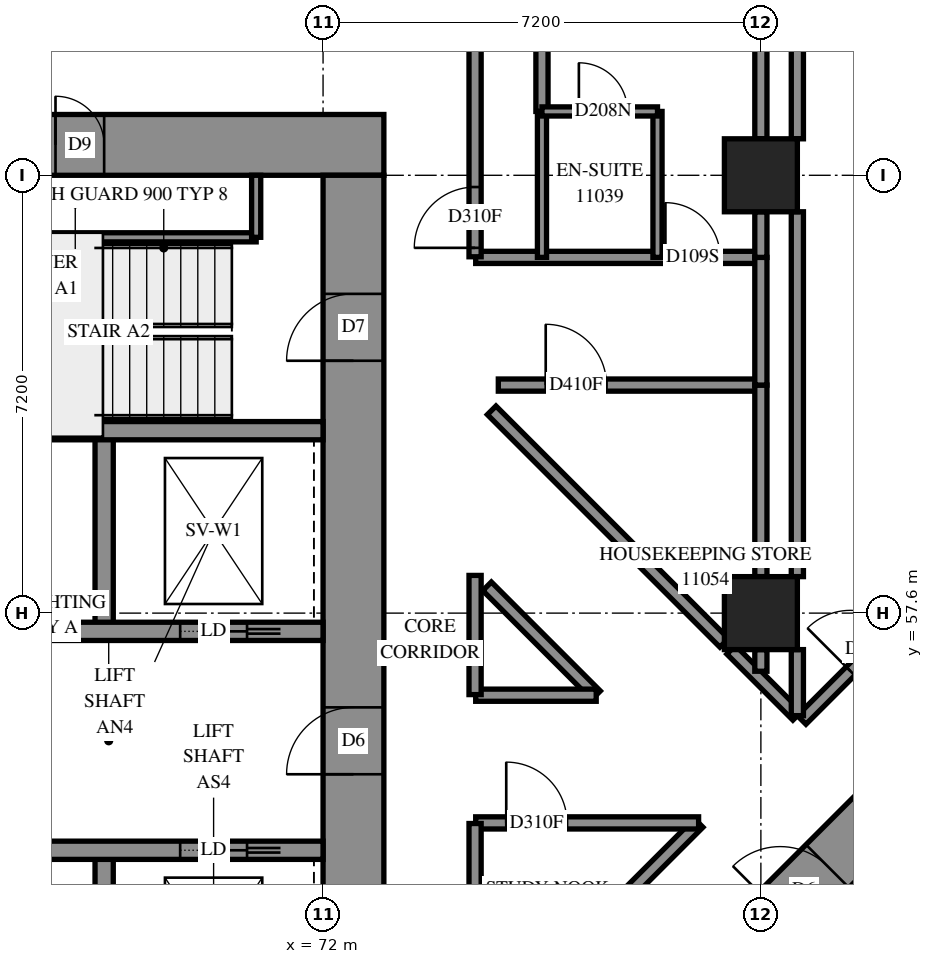
"""IFC4 building model, lengths in metres.
Left out: names, types, materials, properties, quantities, classifications, styles, units other than length and angle.
Written with IfcOpenShell. Run it as: python <this file> out.ifc"""

import sys

from ifc_helpers import new_model, si_unit, direction, frame, frame_2d, origin, origin_2d, place, context, subcontext, project, spatial, rectangle, extrude, element, fill, save


model = new_model("IFC4")
c1 = context("Model", 3, precision=1e-05, world=origin(), true_north=direction((0.0, 1.0)))
c2 = subcontext(c1, "Body", "Model", "MODEL_VIEW")
j1 = project(units=[si_unit("LENGTHUNIT", "METRE"), si_unit("PLANEANGLEUNIT", "RADIAN")], contexts=[c1])
p1 = place(None, origin())
s1 = spatial("IfcSite", under=j1, at=p1, CompositionType="ELEMENT")
p2 = place(p1, origin())
s2 = spatial("IfcBuilding", under=s1, at=p2, CompositionType="ELEMENT")
p3 = place(p2, frame((0.0, 0.0, 44.0)))
s3 = spatial("IfcBuildingStorey", under=s2, at=p3, CompositionType="ELEMENT", Elevation=44.0)
for number, where, z_axis, x_axis in (
    (1, (79.2, 57.6, 0.0), (0.0, 0.0, 1.0), (1.0, 0.0, 0.0)),
    (2, (79.2, 64.8, 0.0), (0.0, 0.0, 1.0), (1.0, 0.0, 0.0)),
):
    element("IfcColumn", number, at=place(p3, frame(where, z_axis=z_axis, x_axis=x_axis)), inside=s3, PredefinedType="COLUMN", context=c2, shape_type="SweptSolid", body=[
        extrude(rectangle(XDim=1.2, YDim=1.2, at=origin_2d()), origin(), (0.0, 0.0, 1.0), 3.1),
    ])
p4 = place(p3, frame((56.6, 65.3, -0.3), z_axis=(0.0, 0.0, 1.0), x_axis=(1.0, 0.0, 0.0)))
e3 = element("IfcWall", 3, at=p4, inside=s3, PredefinedType="SHEAR", context=c2, shape_type="SweptSolid", body=[
    extrude(rectangle(XDim=16.4, YDim=1.0, at=frame_2d((8.2, 0.0))), origin(), (0.0, 0.0, 1.0), 2.7),
])
p5 = place(p4, frame((11.0, 0.0, 0.3)))
e4 = element("IfcOpeningElement", 4, at=p5, cuts=e3, PredefinedType="OPENING", context=c2, shape_type="SweptSolid", body=[
    extrude(rectangle(XDim=0.8, YDim=2.1, at=frame_2d((0.4, 1.05))), frame((0.0, 0.51, 0.0), z_axis=(0.0, -1.0, 0.0), x_axis=(1.0, 0.0, 0.0)), (0.0, 0.0, 1.0), 1.02),
])
p6 = place(p3, frame((72.5, 50.4, -0.3), z_axis=(0.0, 0.0, 1.0), x_axis=(0.0, 1.0, 0.0)))
e5 = element("IfcWall", 5, at=p6, inside=s3, PredefinedType="SHEAR", context=c2, shape_type="SweptSolid", body=[
    extrude(rectangle(XDim=14.4, YDim=1.0, at=frame_2d((7.2, 0.0))), origin(), (0.0, 0.0, 1.0), 2.7),
])
p7 = place(p6, frame((4.55, 0.0, 0.3)))
e6 = element("IfcOpeningElement", 6, at=p7, cuts=e5, PredefinedType="OPENING", context=c2, shape_type="SweptSolid", body=[
    extrude(rectangle(XDim=1.1, YDim=2.1, at=frame_2d((0.55, 1.05))), frame((0.0, 0.51, 0.0), z_axis=(0.0, -1.0, 0.0), x_axis=(1.0, 0.0, 0.0)), (0.0, 0.0, 1.0), 1.02),
])
p8 = place(p6, frame((11.35, 0.0, 0.3)))
e7 = element("IfcOpeningElement", 7, at=p8, cuts=e5, PredefinedType="OPENING", context=c2, shape_type="SweptSolid", body=[
    extrude(rectangle(XDim=1.1, YDim=2.1, at=frame_2d((0.55, 1.05))), frame((0.0, 0.51, 0.0), z_axis=(0.0, -1.0, 0.0), x_axis=(1.0, 0.0, 0.0)), (0.0, 0.0, 1.0), 1.02),
])
for number, where, z_axis, x_axis in (
    (8, (68.4, 50.4, 0.0), (0.0, 0.0, 1.0), (0.0, 1.0, 0.0)),
    (9, (68.4, 57.3, 0.0), (0.0, 0.0, 1.0), (0.0, 1.0, 0.0)),
):
    element("IfcWall", number, at=place(p3, frame(where, z_axis=z_axis, x_axis=x_axis)), inside=s3, PredefinedType="SOLIDWALL", context=c2, shape_type="SweptSolid", body=[
        extrude(rectangle(XDim=3.3, YDim=0.3, at=frame_2d((1.65, 0.0))), origin(), (0.0, 0.0, 1.0), 3.1),
    ])
p9 = place(p3, frame((57.6, 53.7, 0.0), z_axis=(0.0, 0.0, 1.0), x_axis=(1.0, 0.0, 0.0)))
e10 = element("IfcWall", 10, at=p9, inside=s3, PredefinedType="SOLIDWALL", context=c2, shape_type="SweptSolid", body=[
    extrude(rectangle(XDim=14.4, YDim=0.3, at=frame_2d((7.2, 0.0))), origin(), (0.0, 0.0, 1.0), 3.1),
])
p10 = place(p9, frame((1.25, 0.0, 0.0)))
e11 = element("IfcOpeningElement", 11, at=p10, cuts=e10, PredefinedType="OPENING", context=c2, shape_type="SweptSolid", body=[
    extrude(rectangle(XDim=1.1, YDim=2.1, at=frame_2d((0.55, 1.05))), frame((0.0, 0.16, 0.0), z_axis=(0.0, -1.0, 0.0), x_axis=(1.0, 0.0, 0.0)), (0.0, 0.0, 1.0), 0.32),
])
p11 = place(p9, frame((4.85, 0.0, 0.0)))
e12 = element("IfcOpeningElement", 12, at=p11, cuts=e10, PredefinedType="OPENING", context=c2, shape_type="SweptSolid", body=[
    extrude(rectangle(XDim=1.1, YDim=2.1, at=frame_2d((0.55, 1.05))), frame((0.0, 0.16, 0.0), z_axis=(0.0, -1.0, 0.0), x_axis=(1.0, 0.0, 0.0)), (0.0, 0.0, 1.0), 0.32),
])
p12 = place(p9, frame((8.45, 0.0, 0.0)))
e13 = element("IfcOpeningElement", 13, at=p12, cuts=e10, PredefinedType="OPENING", context=c2, shape_type="SweptSolid", body=[
    extrude(rectangle(XDim=1.1, YDim=2.1, at=frame_2d((0.55, 1.05))), frame((0.0, 0.16, 0.0), z_axis=(0.0, -1.0, 0.0), x_axis=(1.0, 0.0, 0.0)), (0.0, 0.0, 1.0), 0.32),
])
p13 = place(p9, frame((12.05, 0.0, 0.0)))
e14 = element("IfcOpeningElement", 14, at=p13, cuts=e10, PredefinedType="OPENING", context=c2, shape_type="SweptSolid", body=[
    extrude(rectangle(XDim=1.1, YDim=2.1, at=frame_2d((0.55, 1.05))), frame((0.0, 0.16, 0.0), z_axis=(0.0, -1.0, 0.0), x_axis=(1.0, 0.0, 0.0)), (0.0, 0.0, 1.0), 0.32),
])
p14 = place(p3, frame((57.6, 57.3, 0.0), z_axis=(0.0, 0.0, 1.0), x_axis=(1.0, 0.0, 0.0)))
e15 = element("IfcWall", 15, at=p14, inside=s3, PredefinedType="SOLIDWALL", context=c2, shape_type="SweptSolid", body=[
    extrude(rectangle(XDim=14.4, YDim=0.3, at=frame_2d((7.2, 0.0))), origin(), (0.0, 0.0, 1.0), 3.1),
])
p15 = place(p14, frame((12.05, 0.0, 0.0)))
e16 = element("IfcOpeningElement", 16, at=p15, cuts=e15, PredefinedType="OPENING", context=c2, shape_type="SweptSolid", body=[
    extrude(rectangle(XDim=1.1, YDim=2.1, at=frame_2d((0.55, 1.05))), frame((0.0, 0.16, 0.0), z_axis=(0.0, -1.0, 0.0), x_axis=(1.0, 0.0, 0.0)), (0.0, 0.0, 1.0), 0.32),
])
p16 = place(p3, frame((64.8, 60.6, 0.0), z_axis=(0.0, 0.0, 1.0), x_axis=(1.0, 0.0, 0.0)))
e17 = element("IfcWall", 17, at=p16, inside=s3, PredefinedType="SOLIDWALL", context=c2, shape_type="SweptSolid", body=[
    extrude(rectangle(XDim=7.2, YDim=0.3, at=frame_2d((3.6, 0.0))), origin(), (0.0, 0.0, 1.0), 3.1),
])
p17 = place(p3, frame((76.301, 49.443, -0.3), z_axis=(0.0, 0.0, 1.0), x_axis=(0.7071067812, 0.7071067812, 0.0)))
e18 = element("IfcWall", 18, at=p17, inside=s3, PredefinedType="SHEAR", context=c2, shape_type="SweptSolid", body=[
    extrude(rectangle(XDim=14.4, YDim=1.0, at=frame_2d((7.2, 0.0))), origin(), (0.0, 0.0, 1.0), 2.7),
])
p18 = place(p17, frame((4.55, 0.0, 0.3)))
e19 = element("IfcOpeningElement", 19, at=p18, cuts=e18, PredefinedType="OPENING", context=c2, shape_type="SweptSolid", body=[
    extrude(rectangle(XDim=1.1, YDim=2.1, at=frame_2d((0.55, 1.05))), frame((0.0, 0.51, 0.0), z_axis=(0.0, -1.0, 0.0), x_axis=(1.0, 0.0, 0.0)), (0.0, 0.0, 1.0), 1.02),
])
p19 = place(p17, frame((11.35, 0.0, 0.3)))
e20 = element("IfcOpeningElement", 20, at=p19, cuts=e18, PredefinedType="OPENING", context=c2, shape_type="SweptSolid", body=[
    extrude(rectangle(XDim=1.1, YDim=2.1, at=frame_2d((0.55, 1.05))), frame((0.0, 0.51, 0.0), z_axis=(0.0, -1.0, 0.0), x_axis=(1.0, 0.0, 0.0)), (0.0, 0.0, 1.0), 1.02),
])
p20 = place(p3, frame((64.95, 63.78, 0.0), z_axis=(0.0, 0.0, 1.0), x_axis=(1.0, 0.0, 0.0)))
e21 = element("IfcWall", 21, at=p20, inside=s3, PredefinedType="PARTITIONING", context=c2, shape_type="SweptSolid", body=[
    extrude(rectangle(XDim=5.95, YDim=0.15, at=frame_2d((2.975, 0.0))), origin(), (0.0, 0.0, 1.0), 3.1),
])
p21 = place(p3, frame((70.9, 63.78, 0.0), z_axis=(0.0, 0.0, 1.0), x_axis=(0.0, 1.0, 0.0)))
e22 = element("IfcWall", 22, at=p21, inside=s3, PredefinedType="PARTITIONING", context=c2, shape_type="SweptSolid", body=[
    extrude(rectangle(XDim=1.02, YDim=0.15, at=frame_2d((0.51, 0.0))), origin(), (0.0, 0.0, 1.0), 3.1),
])
p22 = place(p3, frame((79.871, 55.843, 0.0), z_axis=(0.0, 0.0, 1.0), x_axis=(0.7071067812, 0.7071067812, 0.0)))
e23 = element("IfcWall", 23, at=p22, inside=s3, PredefinedType="PARTITIONING", context=c2, shape_type="SweptSolid", body=[
    extrude(rectangle(XDim=9.85, YDim=0.2, at=frame_2d((4.925, 0.0))), origin(), (0.0, 0.0, 1.0), 3.1),
])
p23 = place(p22, frame((1.135, 0.0, 0.0)))
e24 = element("IfcOpeningElement", 24, at=p23, cuts=e23, PredefinedType="OPENING", context=c2, shape_type="SweptSolid", body=[
    extrude(rectangle(XDim=1.0, YDim=2.1, at=frame_2d((0.5, 1.05))), frame((0.0, 0.11, 0.0), z_axis=(0.0, -1.0, 0.0), x_axis=(1.0, 0.0, 0.0)), (0.0, 0.0, 1.0), 0.22),
])
p24 = place(p3, frame((75.6, 65.85, 0.0), z_axis=(0.0, 0.0, 1.0), x_axis=(0.0, 1.0, 0.0)))
e25 = element("IfcWall", 25, at=p24, inside=s3, PredefinedType="PARTITIONING", context=c2, shape_type="SweptSolid", body=[
    extrude(rectangle(XDim=6.883, YDim=0.2, at=frame_2d((3.442, 0.0))), origin(), (0.0, 0.0, 1.0), 3.1),
])
for number, where, z_axis, x_axis in (
    (26, (79.2, 65.4, 0.0), (0.0, 0.0, 1.0), (0.0, 1.0, 0.0)),
    (27, (79.8, 58.2, 0.0), (0.0, 0.0, 1.0), (0.0, 1.0, 0.0)),
):
    element("IfcWall", number, at=place(p3, frame(where, z_axis=z_axis, x_axis=x_axis)), inside=s3, PredefinedType="PARTITIONING", context=c2, shape_type="SweptSolid", body=[
        extrude(rectangle(XDim=6.0, YDim=0.2, at=frame_2d((3.0, 0.0))), origin(), (0.0, 0.0, 1.0), 3.1),
    ])
p25 = place(p3, frame((74.773, 60.935, 0.0), z_axis=(0.0, 0.0, 1.0), x_axis=(0.7071067812, -0.7071067812, 0.0)))
e28 = element("IfcWall", 28, at=p25, inside=s3, PredefinedType="PARTITIONING", context=c2, shape_type="SweptSolid", body=[
    extrude(rectangle(XDim=5.408, YDim=0.2, at=frame_2d((2.704, 0.0))), origin(), (0.0, 0.0, 1.0), 3.1),
])
p26 = place(p3, frame((74.517, 50.489, 0.0), z_axis=(0.0, 0.0, 1.0), x_axis=(0.7071067812, 0.7071067812, 0.0)))
e29 = element("IfcWall", 29, at=p26, inside=s3, PredefinedType="PARTITIONING", context=c2, shape_type="SweptSolid", body=[
    extrude(rectangle(XDim=5.176, YDim=0.2, at=frame_2d((2.588, 0.0))), origin(), (0.0, 0.0, 1.0), 3.1),
])
p27 = place(p3, frame((74.51, 63.45, 0.0), z_axis=(0.0, 0.0, 1.0), x_axis=(1.0, 0.0, 0.0)))
e30 = element("IfcWall", 30, at=p27, inside=s3, PredefinedType="PARTITIONING", context=c2, shape_type="SweptSolid", body=[
    extrude(rectangle(XDim=4.69, YDim=0.2, at=frame_2d((2.345, 0.0))), origin(), (0.0, 0.0, 1.0), 3.1),
])
p28 = place(p27, frame((3.12, 0.0, 0.0)))
e31 = element("IfcOpeningElement", 31, at=p28, cuts=e30, PredefinedType="OPENING", context=c2, shape_type="SweptSolid", body=[
    extrude(rectangle(XDim=0.9, YDim=2.1, at=frame_2d((0.45, 1.05))), frame((0.0, 0.11, 0.0), z_axis=(0.0, -1.0, 0.0), x_axis=(1.0, 0.0, 0.0)), (0.0, 0.0, 1.0), 0.22),
])
p29 = place(p3, frame((74.882, 61.35, 0.0), z_axis=(0.0, 0.0, 1.0), x_axis=(1.0, 0.0, 0.0)))
e32 = element("IfcWall", 32, at=p29, inside=s3, PredefinedType="PARTITIONING", context=c2, shape_type="SweptSolid", body=[
    extrude(rectangle(XDim=4.318, YDim=0.2, at=frame_2d((2.159, 0.0))), origin(), (0.0, 0.0, 1.0), 3.1),
])
p30 = place(p29, frame((0.78, 0.0, 0.0)))
e33 = element("IfcOpeningElement", 33, at=p30, cuts=e32, PredefinedType="OPENING", context=c2, shape_type="SweptSolid", body=[
    extrude(rectangle(XDim=1.0, YDim=2.1, at=frame_2d((0.5, 1.05))), frame((0.0, 0.11, 0.0), z_axis=(0.0, -1.0, 0.0), x_axis=(1.0, 0.0, 0.0)), (0.0, 0.0, 1.0), 0.22),
])
p31 = place(p3, frame((74.5, 63.46, 0.0), z_axis=(0.0, 0.0, 1.0), x_axis=(0.0, 1.0, 0.0)))
e34 = element("IfcWall", 34, at=p31, inside=s3, PredefinedType="PARTITIONING", context=c2, shape_type="SweptSolid", body=[
    extrude(rectangle(XDim=3.84, YDim=0.2, at=frame_2d((1.92, 0.0))), origin(), (0.0, 0.0, 1.0), 3.1),
])
p32 = place(p31, frame((0.147, 0.0, 0.0)))
e35 = element("IfcOpeningElement", 35, at=p32, cuts=e34, PredefinedType="OPENING", context=c2, shape_type="SweptSolid", body=[
    extrude(rectangle(XDim=1.0, YDim=2.1, at=frame_2d((0.5, 1.05))), frame((0.0, 0.11, 0.0), z_axis=(0.0, -1.0, 0.0), x_axis=(1.0, 0.0, 0.0)), (0.0, 0.0, 1.0), 0.22),
])
p33 = place(p3, frame((74.51, 54.15, 0.0), z_axis=(0.0, 0.0, 1.0), x_axis=(1.0, 0.0, 0.0)))
e36 = element("IfcWall", 36, at=p33, inside=s3, PredefinedType="PARTITIONING", context=c2, shape_type="SweptSolid", body=[
    extrude(rectangle(XDim=3.666, YDim=0.2, at=frame_2d((1.833, 0.0))), origin(), (0.0, 0.0, 1.0), 3.1),
])
p34 = place(p33, frame((0.502, 0.0, 0.0)))
e37 = element("IfcOpeningElement", 37, at=p34, cuts=e36, PredefinedType="OPENING", context=c2, shape_type="SweptSolid", body=[
    extrude(rectangle(XDim=1.0, YDim=2.1, at=frame_2d((0.5, 1.05))), frame((0.0, 0.11, 0.0), z_axis=(0.0, -1.0, 0.0), x_axis=(1.0, 0.0, 0.0)), (0.0, 0.0, 1.0), 0.22),
])
p35 = place(p3, frame((74.5, 50.496, 0.0), z_axis=(0.0, 0.0, 1.0), x_axis=(0.0, 1.0, 0.0)))
e38 = element("IfcWall", 38, at=p35, inside=s3, PredefinedType="PARTITIONING", context=c2, shape_type="SweptSolid", body=[
    extrude(rectangle(XDim=3.644, YDim=0.2, at=frame_2d((1.822, 0.0))), origin(), (0.0, 0.0, 1.0), 3.1),
])
p36 = place(p3, frame((79.2, 58.2, 0.0), z_axis=(0.0, 0.0, 1.0), x_axis=(0.0, 1.0, 0.0)))
e39 = element("IfcWall", 39, at=p36, inside=s3, PredefinedType="PARTITIONING", context=c2, shape_type="SweptSolid", body=[
    extrude(rectangle(XDim=3.15, YDim=0.2, at=frame_2d((1.575, 0.0))), origin(), (0.0, 0.0, 1.0), 3.1),
])
p37 = place(p3, frame((74.697, 58.041, 0.0), z_axis=(0.0, 0.0, 1.0), x_axis=(0.7071067812, -0.7071067812, 0.0)))
e40 = element("IfcWall", 40, at=p37, inside=s3, PredefinedType="PARTITIONING", context=c2, shape_type="SweptSolid", body=[
    extrude(rectangle(XDim=2.534, YDim=0.2, at=frame_2d((1.267, 0.0))), origin(), (0.0, 0.0, 1.0), 3.1),
])
for number, where, z_axis, x_axis in (
    (41, (75.6, 63.45, 0.0), (0.0, 0.0, 1.0), (0.0, 1.0, 0.0)),
    (42, (77.5, 63.45, 0.0), (0.0, 0.0, 1.0), (0.0, 1.0, 0.0)),
):
    element("IfcWall", number, at=place(p3, frame(where, z_axis=z_axis, x_axis=x_axis)), inside=s3, PredefinedType="PARTITIONING", context=c2, shape_type="SweptSolid", body=[
        extrude(rectangle(XDim=2.4, YDim=0.15, at=frame_2d((1.2, 0.0))), origin(), (0.0, 0.0, 1.0), 3.1),
    ])
p38 = place(p3, frame((79.8, 65.4, 0.0), z_axis=(0.0, 0.0, 1.0), x_axis=(0.0, 1.0, 0.0)))
e43 = element("IfcWall", 43, at=p38, inside=s3, PredefinedType="PARTITIONING", context=c2, shape_type="SweptSolid", body=[
    extrude(rectangle(XDim=2.108, YDim=0.2, at=frame_2d((1.054, 0.0))), origin(), (0.0, 0.0, 1.0), 3.1),
])
p39 = place(p3, frame((79.2, 61.35, 0.0), z_axis=(0.0, 0.0, 1.0), x_axis=(0.0, 1.0, 0.0)))
e44 = element("IfcWall", 44, at=p39, inside=s3, PredefinedType="PARTITIONING", context=c2, shape_type="SweptSolid", body=[
    extrude(rectangle(XDim=2.1, YDim=0.2, at=frame_2d((1.05, 0.0))), origin(), (0.0, 0.0, 1.0), 3.1),
])
p40 = place(p3, frame((74.51, 56.25, 0.0), z_axis=(0.0, 0.0, 1.0), x_axis=(1.0, 0.0, 0.0)))
e45 = element("IfcWall", 45, at=p40, inside=s3, PredefinedType="PARTITIONING", context=c2, shape_type="SweptSolid", body=[
    extrude(rectangle(XDim=1.982, YDim=0.2, at=frame_2d((0.991, 0.0))), origin(), (0.0, 0.0, 1.0), 3.1),
])
p41 = place(p3, frame((74.5, 56.26, 0.0), z_axis=(0.0, 0.0, 1.0), x_axis=(0.0, 1.0, 0.0)))
e46 = element("IfcWall", 46, at=p41, inside=s3, PredefinedType="PARTITIONING", context=c2, shape_type="SweptSolid", body=[
    extrude(rectangle(XDim=1.96, YDim=0.2, at=frame_2d((0.98, 0.0))), origin(), (0.0, 0.0, 1.0), 3.1),
])
p42 = place(p3, frame((75.6, 65.85, 0.0), z_axis=(0.0, 0.0, 1.0), x_axis=(1.0, 0.0, 0.0)))
e47 = element("IfcWall", 47, at=p42, inside=s3, PredefinedType="PARTITIONING", context=c2, shape_type="SweptSolid", body=[
    extrude(rectangle(XDim=1.9, YDim=0.15, at=frame_2d((0.95, 0.0))), origin(), (0.0, 0.0, 1.0), 3.1),
])
p43 = place(p42, frame((0.607, 0.0, 0.0)))
e48 = element("IfcOpeningElement", 48, at=p43, cuts=e47, PredefinedType="OPENING", context=c2, shape_type="SweptSolid", body=[
    extrude(rectangle(XDim=0.8, YDim=2.1, at=frame_2d((0.4, 1.05))), frame((0.0, 0.085, 0.0), z_axis=(0.0, -1.0, 0.0), x_axis=(1.0, 0.0, 0.0)), (0.0, 0.0, 1.0), 0.17),
])
p44 = place(p3, frame((78.711, 56.997, 0.0), z_axis=(0.0, 0.0, 1.0), x_axis=(0.7071067812, -0.7071067812, 0.0)))
e49 = element("IfcWall", 49, at=p44, inside=s3, PredefinedType="PARTITIONING", context=c2, shape_type="SweptSolid", body=[
    extrude(rectangle(XDim=1.536, YDim=0.2, at=frame_2d((0.768, 0.0))), origin(), (0.0, 0.0, 1.0), 3.1),
])
p45 = place(p3, frame((79.8, 55.914, 0.0), z_axis=(0.0, 0.0, 1.0), x_axis=(0.0, 1.0, 0.0)))
e50 = element("IfcWall", 50, at=p45, inside=s3, PredefinedType="PARTITIONING", context=c2, shape_type="SweptSolid", body=[
    extrude(rectangle(XDim=1.086, YDim=0.2, at=frame_2d((0.543, 0.0))), origin(), (0.0, 0.0, 1.0), 3.1),
])
p46 = place(p3, frame((79.2, 63.45, 0.0), z_axis=(0.0, 0.0, 1.0), x_axis=(0.0, 1.0, 0.0)))
e51 = element("IfcWall", 51, at=p46, inside=s3, PredefinedType="PARTITIONING", context=c2, shape_type="SweptSolid", body=[
    extrude(rectangle(XDim=0.75, YDim=0.2, at=frame_2d((0.375, 0.0))), origin(), (0.0, 0.0, 1.0), 3.1),
])
p47 = place(p3, frame((79.2, 56.644, 0.0), z_axis=(0.0, 0.0, 1.0), x_axis=(0.0, 1.0, 0.0)))
e52 = element("IfcWall", 52, at=p47, inside=s3, PredefinedType="PARTITIONING", context=c2, shape_type="SweptSolid", body=[
    extrude(rectangle(XDim=0.356, YDim=0.2, at=frame_2d((0.178, 0.0))), origin(), (0.0, 0.0, 1.0), 3.1),
])
p48 = place(p5, origin())
e53 = element("IfcDoor", 53, at=p48, inside=s3, OperationType="SINGLE_SWING_RIGHT", PredefinedType="DOOR", context=c2, shape_type="SweptSolid", body=[
    extrude(rectangle(XDim=0.8, YDim=2.1, at=frame_2d((0.4, 1.05))), frame((0.0, -0.44, 0.0), z_axis=(0.0, -1.0, 0.0), x_axis=(1.0, 0.0, 0.0)), (0.0, 0.0, 1.0), 0.05),
])
fill(e4, e53)
p49 = place(p7, origin())
e54 = element("IfcDoor", 54, at=p49, inside=s3, OperationType="DOUBLE_DOOR_SINGLE_SWING", PredefinedType="DOOR", context=c2, shape_type="SweptSolid", body=[
    extrude(rectangle(XDim=1.1, YDim=2.1, at=frame_2d((0.55, 1.05))), frame((0.0, 0.025, 0.0), z_axis=(0.0, -1.0, 0.0), x_axis=(1.0, 0.0, 0.0)), (0.0, 0.0, 1.0), 0.05),
])
fill(e6, e54)
p50 = place(p8, origin())
e55 = element("IfcDoor", 55, at=p50, inside=s3, OperationType="SINGLE_SWING_RIGHT", PredefinedType="DOOR", context=c2, shape_type="SweptSolid", body=[
    extrude(rectangle(XDim=1.1, YDim=2.1, at=frame_2d((0.55, 1.05))), frame((0.0, 0.025, 0.0), z_axis=(0.0, -1.0, 0.0), x_axis=(1.0, 0.0, 0.0)), (0.0, 0.0, 1.0), 0.05),
])
fill(e7, e55)
p51 = place(p13, origin())
e56 = element("IfcDoor", 56, at=p51, inside=s3, OperationType="SLIDING_TO_RIGHT", PredefinedType="DOOR", context=c2, shape_type="SweptSolid", body=[
    extrude(rectangle(XDim=1.1, YDim=2.1, at=frame_2d((0.55, 1.05))), frame((0.0, 0.025, 0.0), z_axis=(0.0, -1.0, 0.0), x_axis=(1.0, 0.0, 0.0)), (0.0, 0.0, 1.0), 0.05),
])
fill(e14, e56)
p52 = place(p15, origin())
e57 = element("IfcDoor", 57, at=p52, inside=s3, OperationType="SLIDING_TO_RIGHT", PredefinedType="DOOR", context=c2, shape_type="SweptSolid", body=[
    extrude(rectangle(XDim=1.1, YDim=2.1, at=frame_2d((0.55, 1.05))), frame((0.0, 0.025, 0.0), z_axis=(0.0, -1.0, 0.0), x_axis=(1.0, 0.0, 0.0)), (0.0, 0.0, 1.0), 0.05),
])
fill(e16, e57)
p53 = place(p18, origin())
e58 = element("IfcDoor", 58, at=p53, inside=s3, OperationType="DOUBLE_DOOR_SINGLE_SWING", PredefinedType="DOOR", context=c2, shape_type="SweptSolid", body=[
    extrude(rectangle(XDim=1.1, YDim=2.1, at=frame_2d((0.55, 1.05))), frame((0.0, 0.025, 0.0), z_axis=(0.0, -1.0, 0.0), x_axis=(1.0, 0.0, 0.0)), (0.0, 0.0, 1.0), 0.05),
])
fill(e19, e58)
p54 = place(p34, origin())
e59 = element("IfcDoor", 59, at=p54, inside=s3, OperationType="SINGLE_SWING_RIGHT", PredefinedType="DOOR", context=c2, shape_type="SweptSolid", body=[
    extrude(rectangle(XDim=1.0, YDim=2.1, at=frame_2d((0.5, 1.05))), frame((0.0, 0.025, 0.0), z_axis=(0.0, -1.0, 0.0), x_axis=(1.0, 0.0, 0.0)), (0.0, 0.0, 1.0), 0.05),
])
fill(e37, e59)
p55 = place(p32, origin())
e60 = element("IfcDoor", 60, at=p55, inside=s3, OperationType="SINGLE_SWING_RIGHT", PredefinedType="DOOR", context=c2, shape_type="SweptSolid", body=[
    extrude(rectangle(XDim=1.0, YDim=2.1, at=frame_2d((0.5, 1.05))), frame((0.0, 0.025, 0.0), z_axis=(0.0, -1.0, 0.0), x_axis=(1.0, 0.0, 0.0)), (0.0, 0.0, 1.0), 0.05),
])
fill(e35, e60)
p56 = place(p28, origin())
e61 = element("IfcDoor", 61, at=p56, inside=s3, OperationType="SINGLE_SWING_LEFT", PredefinedType="DOOR", context=c2, shape_type="SweptSolid", body=[
    extrude(rectangle(XDim=0.9, YDim=2.1, at=frame_2d((0.45, 1.05))), frame((0.0, 0.025, 0.0), z_axis=(0.0, -1.0, 0.0), x_axis=(1.0, 0.0, 0.0)), (0.0, 0.0, 1.0), 0.05),
])
fill(e31, e61)
p57 = place(p43, origin())
e62 = element("IfcDoor", 62, at=p57, inside=s3, OperationType="SINGLE_SWING_RIGHT", PredefinedType="DOOR", context=c2, shape_type="SweptSolid", body=[
    extrude(rectangle(XDim=0.8, YDim=2.1, at=frame_2d((0.4, 1.05))), frame((0.0, 0.025, 0.0), z_axis=(0.0, -1.0, 0.0), x_axis=(1.0, 0.0, 0.0)), (0.0, 0.0, 1.0), 0.05),
])
fill(e48, e62)
p58 = place(p30, origin())
e63 = element("IfcDoor", 63, at=p58, inside=s3, OperationType="SINGLE_SWING_RIGHT", PredefinedType="DOOR", context=c2, shape_type="SweptSolid", body=[
    extrude(rectangle(XDim=1.0, YDim=2.1, at=frame_2d((0.5, 1.05))), frame((0.0, 0.025, 0.0), z_axis=(0.0, -1.0, 0.0), x_axis=(1.0, 0.0, 0.0)), (0.0, 0.0, 1.0), 0.05),
])
fill(e33, e63)
p59 = place(p23, origin())
e64 = element("IfcDoor", 64, at=p59, inside=s3, OperationType="SINGLE_SWING_RIGHT", PredefinedType="DOOR", context=c2, shape_type="SweptSolid", body=[
    extrude(rectangle(XDim=1.0, YDim=2.1, at=frame_2d((0.5, 1.05))), frame((0.0, 0.025, 0.0), z_axis=(0.0, -1.0, 0.0), x_axis=(1.0, 0.0, 0.0)), (0.0, 0.0, 1.0), 0.05),
])
fill(e24, e64)
save(model, sys.argv[1])
